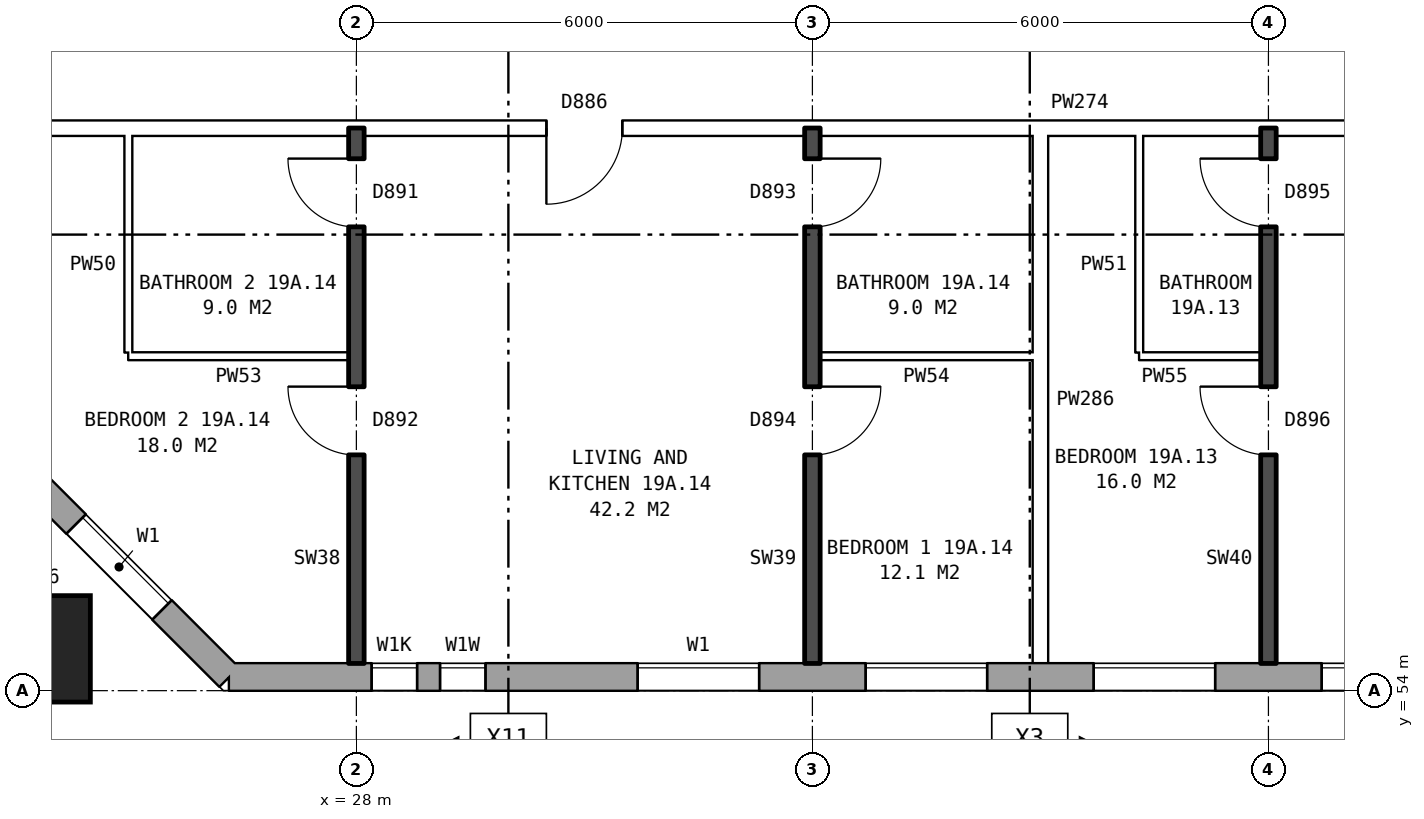
"""IFC4 building model, lengths in metres.
Left out: names, types, materials, properties, quantities, classifications, styles, units other than length and angle.
Written with IfcOpenShell. Run it as: python <this file> out.ifc"""

import sys

from ifc_helpers import new_model, si_unit, direction, frame, frame_2d, origin, origin_2d, place, context, subcontext, project, spatial, rectangle, hollow_rectangle, extrude, element, fill, save


model = new_model("IFC4")
c1 = context("Model", 3, precision=1e-05, world=origin(), true_north=direction((0.0, 1.0)))
c2 = subcontext(c1, "Body", "Model", "MODEL_VIEW")
j1 = project(units=[si_unit("LENGTHUNIT", "METRE"), si_unit("PLANEANGLEUNIT", "RADIAN")], contexts=[c1])
p1 = place(None, origin())
s1 = spatial("IfcSite", under=j1, at=p1, CompositionType="ELEMENT")
p2 = place(p1, origin())
s2 = spatial("IfcBuilding", under=s1, at=p2, CompositionType="ELEMENT")
p3 = place(p2, frame((0.0, 0.0, 71.6)))
s3 = spatial("IfcBuildingStorey", under=s2, at=p3, CompositionType="ELEMENT", Elevation=71.6)
p4 = place(p3, frame((23.8, 54.55, 0.0), z_axis=(0.0, 0.0, 1.0), x_axis=(1.0, 0.0, 0.0)))
e1 = element("IfcColumn", 1, at=p4, inside=s3, PredefinedType="COLUMN", context=c2, shape_type="SweptSolid", body=[
    extrude(hollow_rectangle(XDim=1.4, YDim=1.4, WallThickness=0.075, at=origin_2d()), origin(), (0.0, 0.0, 1.0), 3.1),
])
p5 = place(p3, frame((23.43, 57.075, 0.0), z_axis=(0.0, 0.0, 1.0), x_axis=(0.707106781187, -0.707106781187, 0.0)))
e2 = element("IfcWall", 2, at=p5, inside=s3, PredefinedType="STANDARD", context=c2, shape_type="SweptSolid", body=[
    extrude(rectangle(XDim=4.094, YDim=0.36, at=frame_2d((2.047, 0.0))), origin(), (0.0, 0.0, 1.0), 2.85),
])
p6 = place(p5, frame((1.247, 0.0, 0.8)))
e3 = element("IfcOpeningElement", 3, at=p6, cuts=e2, PredefinedType="OPENING", context=c2, shape_type="SweptSolid", body=[
    extrude(rectangle(XDim=1.6, YDim=1.8, at=frame_2d((0.8, 0.9))), frame((0.0, 0.19, 0.0), z_axis=(0.0, -1.0, 0.0), x_axis=(1.0, 0.0, 0.0)), (0.0, 0.0, 1.0), 0.38),
])
p7 = place(p3, frame((26.325, 54.18, 0.0), z_axis=(0.0, 0.0, 1.0), x_axis=(1.0, 0.0, 0.0)))
e4 = element("IfcWall", 4, at=p7, inside=s3, PredefinedType="STANDARD", context=c2, shape_type="SweptSolid", body=[
    extrude(rectangle(XDim=46.601, YDim=0.36, at=frame_2d((23.3, 0.0))), origin(), (0.0, 0.0, 1.0), 2.85),
])
p8 = place(p7, frame((1.875, 0.0, 1.0)))
e5 = element("IfcOpeningElement", 5, at=p8, cuts=e4, PredefinedType="OPENING", context=c2, shape_type="SweptSolid", body=[
    extrude(rectangle(XDim=0.6, YDim=1.5, at=frame_2d((0.3, 0.75))), frame((0.0, 0.19, 0.0), z_axis=(0.0, -1.0, 0.0), x_axis=(1.0, 0.0, 0.0)), (0.0, 0.0, 1.0), 0.38),
])
p9 = place(p7, frame((5.375, 0.0, 0.8)))
e6 = element("IfcOpeningElement", 6, at=p9, cuts=e4, PredefinedType="OPENING", context=c2, shape_type="SweptSolid", body=[
    extrude(rectangle(XDim=1.6, YDim=1.8, at=frame_2d((0.8, 0.9))), frame((0.0, 0.19, 0.0), z_axis=(0.0, -1.0, 0.0), x_axis=(1.0, 0.0, 0.0)), (0.0, 0.0, 1.0), 0.38),
])
p10 = place(p7, frame((8.375, 0.0, 0.8)))
e7 = element("IfcOpeningElement", 7, at=p10, cuts=e4, PredefinedType="OPENING", context=c2, shape_type="SweptSolid", body=[
    extrude(rectangle(XDim=1.6, YDim=1.8, at=frame_2d((0.8, 0.9))), frame((0.0, 0.19, 0.0), z_axis=(0.0, -1.0, 0.0), x_axis=(1.0, 0.0, 0.0)), (0.0, 0.0, 1.0), 0.38),
])
p11 = place(p7, frame((11.375, 0.0, 0.8)))
e8 = element("IfcOpeningElement", 8, at=p11, cuts=e4, PredefinedType="OPENING", context=c2, shape_type="SweptSolid", body=[
    extrude(rectangle(XDim=1.6, YDim=1.8, at=frame_2d((0.8, 0.9))), frame((0.0, 0.19, 0.0), z_axis=(0.0, -1.0, 0.0), x_axis=(1.0, 0.0, 0.0)), (0.0, 0.0, 1.0), 0.38),
])
p12 = place(p7, frame((14.375, 0.0, 0.8)))
e9 = element("IfcOpeningElement", 9, at=p12, cuts=e4, PredefinedType="OPENING", context=c2, shape_type="SweptSolid", body=[
    extrude(rectangle(XDim=1.6, YDim=1.8, at=frame_2d((0.8, 0.9))), frame((0.0, 0.19, 0.0), z_axis=(0.0, -1.0, 0.0), x_axis=(1.0, 0.0, 0.0)), (0.0, 0.0, 1.0), 0.38),
])
p13 = place(p7, frame((17.375, 0.0, 0.8)))
e10 = element("IfcOpeningElement", 10, at=p13, cuts=e4, PredefinedType="OPENING", context=c2, shape_type="SweptSolid", body=[
    extrude(rectangle(XDim=1.6, YDim=1.8, at=frame_2d((0.8, 0.9))), frame((0.0, 0.19, 0.0), z_axis=(0.0, -1.0, 0.0), x_axis=(1.0, 0.0, 0.0)), (0.0, 0.0, 1.0), 0.38),
])
p14 = place(p7, frame((20.375, 0.0, 0.8)))
e11 = element("IfcOpeningElement", 11, at=p14, cuts=e4, PredefinedType="OPENING", context=c2, shape_type="SweptSolid", body=[
    extrude(rectangle(XDim=1.6, YDim=1.8, at=frame_2d((0.8, 0.9))), frame((0.0, 0.19, 0.0), z_axis=(0.0, -1.0, 0.0), x_axis=(1.0, 0.0, 0.0)), (0.0, 0.0, 1.0), 0.38),
])
p15 = place(p7, frame((23.375, 0.0, 0.8)))
e12 = element("IfcOpeningElement", 12, at=p15, cuts=e4, PredefinedType="OPENING", context=c2, shape_type="SweptSolid", body=[
    extrude(rectangle(XDim=1.6, YDim=1.8, at=frame_2d((0.8, 0.9))), frame((0.0, 0.19, 0.0), z_axis=(0.0, -1.0, 0.0), x_axis=(1.0, 0.0, 0.0)), (0.0, 0.0, 1.0), 0.38),
])
p16 = place(p7, frame((26.375, 0.0, 0.8)))
e13 = element("IfcOpeningElement", 13, at=p16, cuts=e4, PredefinedType="OPENING", context=c2, shape_type="SweptSolid", body=[
    extrude(rectangle(XDim=1.6, YDim=1.8, at=frame_2d((0.8, 0.9))), frame((0.0, 0.19, 0.0), z_axis=(0.0, -1.0, 0.0), x_axis=(1.0, 0.0, 0.0)), (0.0, 0.0, 1.0), 0.38),
])
p17 = place(p7, frame((29.375, 0.0, 0.8)))
e14 = element("IfcOpeningElement", 14, at=p17, cuts=e4, PredefinedType="OPENING", context=c2, shape_type="SweptSolid", body=[
    extrude(rectangle(XDim=1.6, YDim=1.8, at=frame_2d((0.8, 0.9))), frame((0.0, 0.19, 0.0), z_axis=(0.0, -1.0, 0.0), x_axis=(1.0, 0.0, 0.0)), (0.0, 0.0, 1.0), 0.38),
])
p18 = place(p7, frame((32.375, 0.0, 0.8)))
e15 = element("IfcOpeningElement", 15, at=p18, cuts=e4, PredefinedType="OPENING", context=c2, shape_type="SweptSolid", body=[
    extrude(rectangle(XDim=1.6, YDim=1.8, at=frame_2d((0.8, 0.9))), frame((0.0, 0.19, 0.0), z_axis=(0.0, -1.0, 0.0), x_axis=(1.0, 0.0, 0.0)), (0.0, 0.0, 1.0), 0.38),
])
p19 = place(p7, frame((35.375, 0.0, 0.8)))
e16 = element("IfcOpeningElement", 16, at=p19, cuts=e4, PredefinedType="OPENING", context=c2, shape_type="SweptSolid", body=[
    extrude(rectangle(XDim=1.6, YDim=1.8, at=frame_2d((0.8, 0.9))), frame((0.0, 0.19, 0.0), z_axis=(0.0, -1.0, 0.0), x_axis=(1.0, 0.0, 0.0)), (0.0, 0.0, 1.0), 0.38),
])
p20 = place(p7, frame((38.375, 0.0, 0.8)))
e17 = element("IfcOpeningElement", 17, at=p20, cuts=e4, PredefinedType="OPENING", context=c2, shape_type="SweptSolid", body=[
    extrude(rectangle(XDim=1.6, YDim=1.8, at=frame_2d((0.8, 0.9))), frame((0.0, 0.19, 0.0), z_axis=(0.0, -1.0, 0.0), x_axis=(1.0, 0.0, 0.0)), (0.0, 0.0, 1.0), 0.38),
])
p21 = place(p7, frame((40.275, 0.0, 0.8)))
e18 = element("IfcOpeningElement", 18, at=p21, cuts=e4, PredefinedType="OPENING", context=c2, shape_type="SweptSolid", body=[
    extrude(rectangle(XDim=0.6, YDim=1.8, at=frame_2d((0.3, 0.9))), frame((0.0, 0.19, 0.0), z_axis=(0.0, -1.0, 0.0), x_axis=(1.0, 0.0, 0.0)), (0.0, 0.0, 1.0), 0.38),
])
p22 = place(p7, frame((44.375, 0.0, 0.8)))
e19 = element("IfcOpeningElement", 19, at=p22, cuts=e4, PredefinedType="OPENING", context=c2, shape_type="SweptSolid", body=[
    extrude(rectangle(XDim=1.6, YDim=1.8, at=frame_2d((0.8, 0.9))), frame((0.0, 0.19, 0.0), z_axis=(0.0, -1.0, 0.0), x_axis=(1.0, 0.0, 0.0)), (0.0, 0.0, 1.0), 0.38),
])
p23 = place(p7, frame((2.775, 0.0, 1.7)))
e20 = element("IfcOpeningElement", 20, at=p23, cuts=e4, PredefinedType="OPENING", context=c2, shape_type="SweptSolid", body=[
    extrude(rectangle(XDim=0.6, YDim=0.9, at=frame_2d((0.3, 0.45))), frame((0.0, 0.19, 0.0), z_axis=(0.0, -1.0, 0.0), x_axis=(1.0, 0.0, 0.0)), (0.0, 0.0, 1.0), 0.38),
])
p24 = place(p7, frame((41.175, 0.0, 0.8)))
e21 = element("IfcOpeningElement", 21, at=p24, cuts=e4, PredefinedType="OPENING", context=c2, shape_type="SweptSolid", body=[
    extrude(rectangle(XDim=0.8, YDim=0.9, at=frame_2d((0.4, 0.45))), frame((0.0, 0.19, 0.0), z_axis=(0.0, -1.0, 0.0), x_axis=(1.0, 0.0, 0.0)), (0.0, 0.0, 1.0), 0.38),
])
p25 = place(p3, frame((25.0, 58.4, 0.0), z_axis=(0.0, 0.0, 1.0), x_axis=(1.0, 0.0, 0.0)))
e22 = element("IfcWall", 22, at=p25, inside=s3, PredefinedType="PARTITIONING", context=c2, shape_type="SweptSolid", body=[
    extrude(rectangle(XDim=2.9, YDim=0.1, at=frame_2d((1.45, 0.0))), origin(), (0.0, 0.0, 1.0), 2.85),
])
p26 = place(p3, frame((34.1, 58.4, 0.0), z_axis=(0.0, 0.0, 1.0), x_axis=(1.0, 0.0, 0.0)))
e23 = element("IfcWall", 23, at=p26, inside=s3, PredefinedType="PARTITIONING", context=c2, shape_type="SweptSolid", body=[
    extrude(rectangle(XDim=2.8, YDim=0.1, at=frame_2d((1.4, 0.0))), origin(), (0.0, 0.0, 1.0), 2.85),
])
p27 = place(p3, frame((38.3, 58.4, 0.0), z_axis=(0.0, 0.0, 1.0), x_axis=(1.0, 0.0, 0.0)))
e24 = element("IfcWall", 24, at=p27, inside=s3, PredefinedType="PARTITIONING", context=c2, shape_type="SweptSolid", body=[
    extrude(rectangle(XDim=1.6, YDim=0.1, at=frame_2d((0.8, 0.0))), origin(), (0.0, 0.0, 1.0), 2.85),
])
p28 = place(p3, frame((23.61, 61.4, 0.0), z_axis=(0.0, 0.0, 1.0), x_axis=(1.0, 0.0, 0.0)))
e25 = element("IfcWall", 25, at=p28, inside=s3, PredefinedType="PARTITIONING", context=c2, shape_type="SweptSolid", body=[
    extrude(rectangle(XDim=22.29, YDim=0.2, at=frame_2d((11.145, 0.0))), origin(), (0.0, 0.0, 1.0), 2.85),
])
p29 = place(p28, frame((18.84, 0.0, 0.0)))
e26 = element("IfcOpeningElement", 26, at=p29, cuts=e25, PredefinedType="OPENING", context=c2, shape_type="SweptSolid", body=[
    extrude(rectangle(XDim=1.0, YDim=2.1, at=frame_2d((0.5, 1.05))), frame((0.0, 0.11, 0.0), z_axis=(0.0, -1.0, 0.0), x_axis=(1.0, 0.0, 0.0)), (0.0, 0.0, 1.0), 0.22),
])
p30 = place(p28, frame((6.89, 0.0, 0.0)))
e27 = element("IfcOpeningElement", 27, at=p30, cuts=e25, PredefinedType="OPENING", context=c2, shape_type="SweptSolid", body=[
    extrude(rectangle(XDim=1.0, YDim=2.1, at=frame_2d((0.5, 1.05))), frame((0.0, 0.11, 0.0), z_axis=(0.0, -1.0, 0.0), x_axis=(1.0, 0.0, 0.0)), (0.0, 0.0, 1.0), 0.22),
])
p31 = place(p3, frame((25.0, 58.45, 0.0), z_axis=(0.0, 0.0, 1.0), x_axis=(0.0, 1.0, 0.0)))
e28 = element("IfcWall", 28, at=p31, inside=s3, PredefinedType="PARTITIONING", context=c2, shape_type="SweptSolid", body=[
    extrude(rectangle(XDim=2.85, YDim=0.1, at=frame_2d((1.425, 0.0))), origin(), (0.0, 0.0, 1.0), 2.85),
])
p32 = place(p3, frame((28.0, 54.36, 0.0), z_axis=(0.0, 0.0, 1.0), x_axis=(0.0, 1.0, 0.0)))
e29 = element("IfcWall", 29, at=p32, inside=s3, PredefinedType="SOLIDWALL", context=c2, shape_type="SweptSolid", body=[
    extrude(rectangle(XDim=7.04, YDim=0.2, at=frame_2d((3.52, 0.0))), origin(), (0.0, 0.0, 1.0), 2.85),
])
p33 = place(p32, frame((2.74, 0.0, 0.0)))
e30 = element("IfcOpeningElement", 30, at=p33, cuts=e29, PredefinedType="OPENING", context=c2, shape_type="SweptSolid", body=[
    extrude(rectangle(XDim=0.9, YDim=2.1, at=frame_2d((0.45, 1.05))), frame((0.0, 0.11, 0.0), z_axis=(0.0, -1.0, 0.0), x_axis=(1.0, 0.0, 0.0)), (0.0, 0.0, 1.0), 0.22),
])
p34 = place(p32, frame((5.74, 0.0, 0.0)))
e31 = element("IfcOpeningElement", 31, at=p34, cuts=e29, PredefinedType="OPENING", context=c2, shape_type="SweptSolid", body=[
    extrude(rectangle(XDim=0.9, YDim=2.1, at=frame_2d((0.45, 1.05))), frame((0.0, 0.11, 0.0), z_axis=(0.0, -1.0, 0.0), x_axis=(1.0, 0.0, 0.0)), (0.0, 0.0, 1.0), 0.22),
])
p35 = place(p3, frame((34.0, 54.36, 0.0), z_axis=(0.0, 0.0, 1.0), x_axis=(0.0, 1.0, 0.0)))
e32 = element("IfcWall", 32, at=p35, inside=s3, PredefinedType="SOLIDWALL", context=c2, shape_type="SweptSolid", body=[
    extrude(rectangle(XDim=7.04, YDim=0.2, at=frame_2d((3.52, 0.0))), origin(), (0.0, 0.0, 1.0), 2.85),
])
p36 = place(p35, frame((2.74, 0.0, 0.0)))
e33 = element("IfcOpeningElement", 33, at=p36, cuts=e32, PredefinedType="OPENING", context=c2, shape_type="SweptSolid", body=[
    extrude(rectangle(XDim=0.9, YDim=2.1, at=frame_2d((0.45, 1.05))), frame((0.0, 0.11, 0.0), z_axis=(0.0, -1.0, 0.0), x_axis=(1.0, 0.0, 0.0)), (0.0, 0.0, 1.0), 0.22),
])
p37 = place(p35, frame((5.74, 0.0, 0.0)))
e34 = element("IfcOpeningElement", 34, at=p37, cuts=e32, PredefinedType="OPENING", context=c2, shape_type="SweptSolid", body=[
    extrude(rectangle(XDim=0.9, YDim=2.1, at=frame_2d((0.45, 1.05))), frame((0.0, 0.11, 0.0), z_axis=(0.0, -1.0, 0.0), x_axis=(1.0, 0.0, 0.0)), (0.0, 0.0, 1.0), 0.22),
])
p38 = place(p3, frame((37.0, 54.36, 0.0), z_axis=(0.0, 0.0, 1.0), x_axis=(0.0, 1.0, 0.0)))
e35 = element("IfcWall", 35, at=p38, inside=s3, PredefinedType="PARTITIONING", context=c2, shape_type="SweptSolid", body=[
    extrude(rectangle(XDim=6.94, YDim=0.2, at=frame_2d((3.47, 0.0))), origin(), (0.0, 0.0, 1.0), 2.85),
])
p39 = place(p3, frame((38.3, 58.45, 0.0), z_axis=(0.0, 0.0, 1.0), x_axis=(0.0, 1.0, 0.0)))
e36 = element("IfcWall", 36, at=p39, inside=s3, PredefinedType="PARTITIONING", context=c2, shape_type="SweptSolid", body=[
    extrude(rectangle(XDim=2.85, YDim=0.1, at=frame_2d((1.425, 0.0))), origin(), (0.0, 0.0, 1.0), 2.85),
])
p40 = place(p3, frame((40.0, 54.36, 0.0), z_axis=(0.0, 0.0, 1.0), x_axis=(0.0, 1.0, 0.0)))
e37 = element("IfcWall", 37, at=p40, inside=s3, PredefinedType="SOLIDWALL", context=c2, shape_type="SweptSolid", body=[
    extrude(rectangle(XDim=7.04, YDim=0.2, at=frame_2d((3.52, 0.0))), origin(), (0.0, 0.0, 1.0), 2.85),
])
p41 = place(p40, frame((2.74, 0.0, 0.0)))
e38 = element("IfcOpeningElement", 38, at=p41, cuts=e37, PredefinedType="OPENING", context=c2, shape_type="SweptSolid", body=[
    extrude(rectangle(XDim=0.9, YDim=2.1, at=frame_2d((0.45, 1.05))), frame((0.0, 0.11, 0.0), z_axis=(0.0, -1.0, 0.0), x_axis=(1.0, 0.0, 0.0)), (0.0, 0.0, 1.0), 0.22),
])
p42 = place(p40, frame((5.74, 0.0, 0.0)))
e39 = element("IfcOpeningElement", 39, at=p42, cuts=e37, PredefinedType="OPENING", context=c2, shape_type="SweptSolid", body=[
    extrude(rectangle(XDim=0.9, YDim=2.1, at=frame_2d((0.45, 1.05))), frame((0.0, 0.11, 0.0), z_axis=(0.0, -1.0, 0.0), x_axis=(1.0, 0.0, 0.0)), (0.0, 0.0, 1.0), 0.22),
])
p43 = place(p6, origin())
e40 = element("IfcWindow", 40, at=p43, inside=s3, PartitioningType="SINGLE_PANEL", PredefinedType="WINDOW", context=c2, shape_type="SweptSolid", body=[
    extrude(rectangle(XDim=1.6, YDim=1.8, at=frame_2d((0.8, 0.9))), frame((0.0, 0.15, 0.0), z_axis=(0.0, -1.0, 0.0), x_axis=(1.0, 0.0, 0.0)), (0.0, 0.0, 1.0), 0.06),
])
fill(e3, e40)
p44 = place(p8, origin())
e41 = element("IfcWindow", 41, at=p44, inside=s3, PartitioningType="SINGLE_PANEL", PredefinedType="WINDOW", context=c2, shape_type="SweptSolid", body=[
    extrude(rectangle(XDim=0.6, YDim=1.5, at=frame_2d((0.3, 0.75))), frame((0.0, 0.15, 0.0), z_axis=(0.0, -1.0, 0.0), x_axis=(1.0, 0.0, 0.0)), (0.0, 0.0, 1.0), 0.06),
])
fill(e5, e41)
p45 = place(p9, origin())
e42 = element("IfcWindow", 42, at=p45, inside=s3, PartitioningType="SINGLE_PANEL", PredefinedType="WINDOW", context=c2, shape_type="SweptSolid", body=[
    extrude(rectangle(XDim=1.6, YDim=1.8, at=frame_2d((0.8, 0.9))), frame((0.0, 0.15, 0.0), z_axis=(0.0, -1.0, 0.0), x_axis=(1.0, 0.0, 0.0)), (0.0, 0.0, 1.0), 0.06),
])
fill(e6, e42)
p46 = place(p10, origin())
e43 = element("IfcWindow", 43, at=p46, inside=s3, PartitioningType="SINGLE_PANEL", PredefinedType="WINDOW", context=c2, shape_type="SweptSolid", body=[
    extrude(rectangle(XDim=1.6, YDim=1.8, at=frame_2d((0.8, 0.9))), frame((0.0, 0.15, 0.0), z_axis=(0.0, -1.0, 0.0), x_axis=(1.0, 0.0, 0.0)), (0.0, 0.0, 1.0), 0.06),
])
fill(e7, e43)
p47 = place(p11, origin())
e44 = element("IfcWindow", 44, at=p47, inside=s3, PartitioningType="SINGLE_PANEL", PredefinedType="WINDOW", context=c2, shape_type="SweptSolid", body=[
    extrude(rectangle(XDim=1.6, YDim=1.8, at=frame_2d((0.8, 0.9))), frame((0.0, 0.15, 0.0), z_axis=(0.0, -1.0, 0.0), x_axis=(1.0, 0.0, 0.0)), (0.0, 0.0, 1.0), 0.06),
])
fill(e8, e44)
p48 = place(p12, origin())
e45 = element("IfcWindow", 45, at=p48, inside=s3, PartitioningType="SINGLE_PANEL", PredefinedType="WINDOW", context=c2, shape_type="SweptSolid", body=[
    extrude(rectangle(XDim=1.6, YDim=1.8, at=frame_2d((0.8, 0.9))), frame((0.0, 0.15, 0.0), z_axis=(0.0, -1.0, 0.0), x_axis=(1.0, 0.0, 0.0)), (0.0, 0.0, 1.0), 0.06),
])
fill(e9, e45)
p49 = place(p41, origin())
e46 = element("IfcDoor", 46, at=p49, inside=s3, OperationType="SINGLE_SWING_RIGHT", PredefinedType="DOOR", context=c2, shape_type="SweptSolid", body=[
    extrude(rectangle(XDim=0.9, YDim=2.1, at=frame_2d((0.45, 1.05))), frame((0.0, 0.025, 0.0), z_axis=(0.0, -1.0, 0.0), x_axis=(1.0, 0.0, 0.0)), (0.0, 0.0, 1.0), 0.05),
])
fill(e38, e46)
p50 = place(p42, origin())
e47 = element("IfcDoor", 47, at=p50, inside=s3, OperationType="SINGLE_SWING_RIGHT", PredefinedType="DOOR", context=c2, shape_type="SweptSolid", body=[
    extrude(rectangle(XDim=0.9, YDim=2.1, at=frame_2d((0.45, 1.05))), frame((0.0, 0.025, 0.0), z_axis=(0.0, -1.0, 0.0), x_axis=(1.0, 0.0, 0.0)), (0.0, 0.0, 1.0), 0.05),
])
fill(e39, e47)
p51 = place(p36, frame((0.9, 0.0, 0.0), z_axis=(0.0, 0.0, 1.0), x_axis=(-1.0, 0.0, 0.0)))
e48 = element("IfcDoor", 48, at=p51, inside=s3, OperationType="SINGLE_SWING_LEFT", PredefinedType="DOOR", context=c2, shape_type="SweptSolid", body=[
    extrude(rectangle(XDim=0.9, YDim=2.1, at=frame_2d((0.45, 1.05))), frame((0.0, 0.025, 0.0), z_axis=(0.0, -1.0, 0.0), x_axis=(1.0, 0.0, 0.0)), (0.0, 0.0, 1.0), 0.05),
])
fill(e33, e48)
p52 = place(p33, origin())
e49 = element("IfcDoor", 49, at=p52, inside=s3, OperationType="SINGLE_SWING_RIGHT", PredefinedType="DOOR", context=c2, shape_type="SweptSolid", body=[
    extrude(rectangle(XDim=0.9, YDim=2.1, at=frame_2d((0.45, 1.05))), frame((0.0, 0.025, 0.0), z_axis=(0.0, -1.0, 0.0), x_axis=(1.0, 0.0, 0.0)), (0.0, 0.0, 1.0), 0.05),
])
fill(e30, e49)
p53 = place(p30, frame((1.0, 0.0, 0.0), z_axis=(0.0, 0.0, 1.0), x_axis=(-1.0, 0.0, 0.0)))
e50 = element("IfcDoor", 50, at=p53, inside=s3, OperationType="SINGLE_SWING_RIGHT", PredefinedType="DOOR", context=c2, shape_type="SweptSolid", body=[
    extrude(rectangle(XDim=1.0, YDim=2.1, at=frame_2d((0.5, 1.05))), frame((0.0, 0.025, 0.0), z_axis=(0.0, -1.0, 0.0), x_axis=(1.0, 0.0, 0.0)), (0.0, 0.0, 1.0), 0.05),
])
fill(e27, e50)
p54 = place(p37, frame((0.9, 0.0, 0.0), z_axis=(0.0, 0.0, 1.0), x_axis=(-1.0, 0.0, 0.0)))
e51 = element("IfcDoor", 51, at=p54, inside=s3, OperationType="SINGLE_SWING_LEFT", PredefinedType="DOOR", context=c2, shape_type="SweptSolid", body=[
    extrude(rectangle(XDim=0.9, YDim=2.1, at=frame_2d((0.45, 1.05))), frame((0.0, 0.025, 0.0), z_axis=(0.0, -1.0, 0.0), x_axis=(1.0, 0.0, 0.0)), (0.0, 0.0, 1.0), 0.05),
])
fill(e34, e51)
p55 = place(p34, origin())
e52 = element("IfcDoor", 52, at=p55, inside=s3, OperationType="SINGLE_SWING_RIGHT", PredefinedType="DOOR", context=c2, shape_type="SweptSolid", body=[
    extrude(rectangle(XDim=0.9, YDim=2.1, at=frame_2d((0.45, 1.05))), frame((0.0, 0.025, 0.0), z_axis=(0.0, -1.0, 0.0), x_axis=(1.0, 0.0, 0.0)), (0.0, 0.0, 1.0), 0.05),
])
fill(e31, e52)
p56 = place(p23, origin())
e53 = element("IfcWindow", 53, at=p56, inside=s3, PartitioningType="SINGLE_PANEL", PredefinedType="WINDOW", context=c2, shape_type="SweptSolid", body=[
    extrude(rectangle(XDim=0.6, YDim=0.9, at=frame_2d((0.3, 0.45))), frame((0.0, 0.15, 0.0), z_axis=(0.0, -1.0, 0.0), x_axis=(1.0, 0.0, 0.0)), (0.0, 0.0, 1.0), 0.06),
])
fill(e20, e53)
save(model, sys.argv[1])
